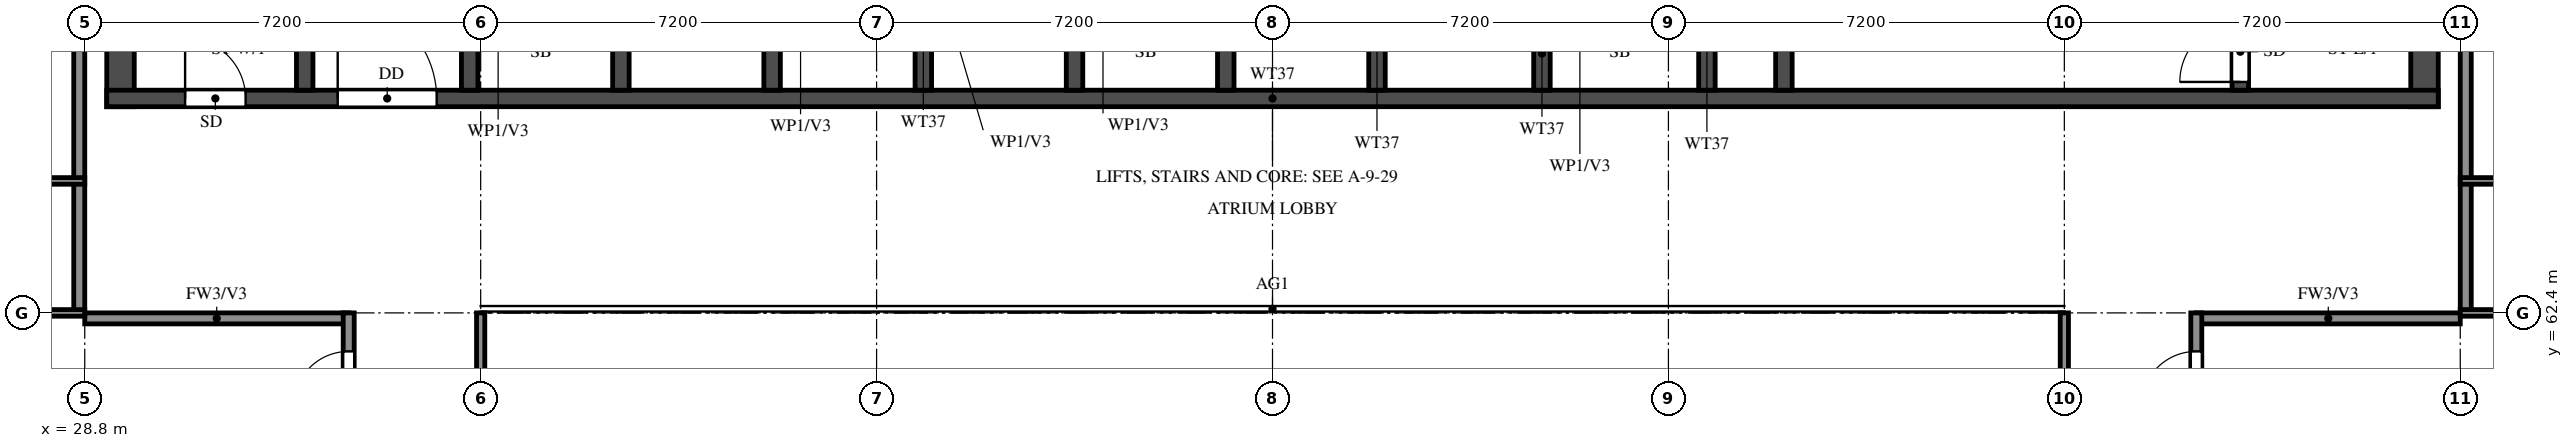
"""IFC4 building model, lengths in metres.
Left out: names, types, materials, properties, quantities, classifications, styles, units other than length and angle.
Written with IfcOpenShell. Run it as: python <this file> out.ifc"""

import sys

from ifc_helpers import new_model, si_unit, direction, frame, frame_2d, origin, place, context, subcontext, project, spatial, rectangle, extrude, element, fill, save


model = new_model("IFC4")
c1 = context("Model", 3, precision=1e-05, world=origin(), true_north=direction((0.0, 1.0)))
c2 = subcontext(c1, "Body", "Model", "MODEL_VIEW")
j1 = project(units=[si_unit("LENGTHUNIT", "METRE"), si_unit("PLANEANGLEUNIT", "RADIAN")], contexts=[c1])
p1 = place(None, origin())
s1 = spatial("IfcSite", under=j1, at=p1, CompositionType="ELEMENT")
p2 = place(p1, origin())
s2 = spatial("IfcBuilding", under=s1, at=p2, CompositionType="ELEMENT")
p3 = place(p2, frame((0.0, 0.0, 222.0)))
s3 = spatial("IfcBuildingStorey", under=s2, at=p3, CompositionType="ELEMENT", Elevation=222.0)
for number, where, z_axis, x_axis in (
    (1, (29.45, 66.15, 0.0), (0.0, 0.0, 1.0), (0.0, 1.0, 0.0)),
    (2, (71.35, 66.15, 0.0), (0.0, 0.0, 1.0), (0.0, 1.0, 0.0)),
):
    element("IfcWall", number, at=place(p3, frame(where, z_axis=z_axis, x_axis=x_axis)), inside=s3, PredefinedType="SHEAR", context=c2, shape_type="SweptSolid", body=[
        extrude(rectangle(XDim=11.85, YDim=0.5, at=frame_2d((5.925, 0.0))), origin(), (0.0, 0.0, 1.0), 3.22),
    ])
p4 = place(p3, frame((29.2, 66.3, 0.0), z_axis=(0.0, 0.0, 1.0), x_axis=(1.0, 0.0, 0.0)))
e3 = element("IfcWall", 3, at=p4, inside=s3, PredefinedType="SHEAR", context=c2, shape_type="SweptSolid", body=[
    extrude(rectangle(XDim=42.4, YDim=0.3, at=frame_2d((21.2, 0.0))), origin(), (0.0, 0.0, 1.0), 3.22),
])
p5 = place(p4, frame((1.425, 0.0, 0.0)))
e4 = element("IfcOpeningElement", 4, at=p5, cuts=e3, PredefinedType="OPENING", context=c2, shape_type="SweptSolid", body=[
    extrude(rectangle(XDim=1.1, YDim=2.1, at=frame_2d((0.55, 1.05))), frame((0.0, 0.16, 0.0), z_axis=(0.0, -1.0, 0.0), x_axis=(1.0, 0.0, 0.0)), (0.0, 0.0, 1.0), 0.32),
])
p6 = place(p4, frame((4.2, 0.0, 0.0)))
e5 = element("IfcOpeningElement", 5, at=p6, cuts=e3, PredefinedType="OPENING", context=c2, shape_type="SweptSolid", body=[
    extrude(rectangle(XDim=1.8, YDim=2.1, at=frame_2d((0.9, 1.05))), frame((0.0, 0.16, 0.0), z_axis=(0.0, -1.0, 0.0), x_axis=(1.0, 0.0, 0.0)), (0.0, 0.0, 1.0), 0.32),
])
p7 = place(p3, frame((32.8, 66.45, 0.0), z_axis=(0.0, 0.0, 1.0), x_axis=(0.0, 1.0, 0.0)))
e6 = element("IfcWall", 6, at=p7, inside=s3, PredefinedType="SHEAR", context=c2, shape_type="SweptSolid", body=[
    extrude(rectangle(XDim=11.05, YDim=0.3, at=frame_2d((5.525, 0.0))), origin(), (0.0, 0.0, 1.0), 3.22),
])
p8 = place(p3, frame((68.0, 66.45, 0.0), z_axis=(0.0, 0.0, 1.0), x_axis=(0.0, 1.0, 0.0)))
e7 = element("IfcWall", 7, at=p8, inside=s3, PredefinedType="SHEAR", context=c2, shape_type="SweptSolid", body=[
    extrude(rectangle(XDim=11.05, YDim=0.3, at=frame_2d((5.525, 0.0))), origin(), (0.0, 0.0, 1.0), 3.22),
])
p9 = place(p8, frame((0.15, 0.0, 0.0)))
e8 = element("IfcOpeningElement", 8, at=p9, cuts=e7, PredefinedType="OPENING", context=c2, shape_type="SweptSolid", body=[
    extrude(rectangle(XDim=1.1, YDim=2.1, at=frame_2d((0.55, 1.05))), frame((0.0, 0.16, 0.0), z_axis=(0.0, -1.0, 0.0), x_axis=(1.0, 0.0, 0.0)), (0.0, 0.0, 1.0), 0.32),
])
p10 = place(p3, frame((59.7, 66.45, 0.0), z_axis=(0.0, 0.0, 1.0), x_axis=(0.0, 1.0, 0.0)))
e9 = element("IfcWall", 9, at=p10, inside=s3, PredefinedType="SHEAR", context=c2, shape_type="SweptSolid", body=[
    extrude(rectangle(XDim=6.175, YDim=0.3, at=frame_2d((3.087, 0.0))), origin(), (0.0, 0.0, 1.0), 3.22),
])
p11 = place(p10, frame((3.85, 0.0, 0.0)))
e10 = element("IfcOpeningElement", 10, at=p11, cuts=e9, PredefinedType="OPENING", context=c2, shape_type="SweptSolid", body=[
    extrude(rectangle(XDim=1.2, YDim=2.1, at=frame_2d((0.6, 1.05))), frame((0.0, 0.16, 0.0), z_axis=(0.0, -1.0, 0.0), x_axis=(1.0, 0.0, 0.0)), (0.0, 0.0, 1.0), 0.32),
])
for number, where, z_axis, x_axis in (
    (11, (35.8, 66.45, 0.0), (0.0, 0.0, 1.0), (0.0, 1.0, 0.0)),
    (12, (38.55, 66.45, 0.0), (0.0, 0.0, 1.0), (0.0, 1.0, 0.0)),
    (13, (41.3, 66.45, 0.0), (0.0, 0.0, 1.0), (0.0, 1.0, 0.0)),
    (14, (44.05, 66.45, 0.0), (0.0, 0.0, 1.0), (0.0, 1.0, 0.0)),
    (15, (46.8, 66.45, 0.0), (0.0, 0.0, 1.0), (0.0, 1.0, 0.0)),
    (16, (49.55, 66.45, 0.0), (0.0, 0.0, 1.0), (0.0, 1.0, 0.0)),
    (17, (52.3, 66.45, 0.0), (0.0, 0.0, 1.0), (0.0, 1.0, 0.0)),
    (18, (55.3, 66.45, 0.0), (0.0, 0.0, 1.0), (0.0, 1.0, 0.0)),
    (19, (58.3, 66.45, 0.0), (0.0, 0.0, 1.0), (0.0, 1.0, 0.0)),
):
    element("IfcWall", number, at=place(p3, frame(where, z_axis=z_axis, x_axis=x_axis)), inside=s3, PredefinedType="SHEAR", context=c2, shape_type="SweptSolid", body=[
        extrude(rectangle(XDim=2.425, YDim=0.3, at=frame_2d((1.212, 0.0))), origin(), (0.0, 0.0, 1.0), 3.22),
    ])
for number, where, z_axis, x_axis in (
    (20, (28.8, 62.3, 0.0), (0.0, 0.0, 1.0), (1.0, 0.0, 0.0)),
    (21, (67.2, 62.3, 0.0), (0.0, 0.0, 1.0), (1.0, 0.0, 0.0)),
):
    element("IfcWall", number, at=place(p3, frame(where, z_axis=z_axis, x_axis=x_axis)), inside=s3, PredefinedType="SOLIDWALL", context=c2, shape_type="SweptSolid", body=[
        extrude(rectangle(XDim=4.8, YDim=0.2, at=frame_2d((2.4, 0.0))), origin(), (0.0, 0.0, 1.0), 3.22),
    ])
p12 = place(p3, frame((28.7, 62.4, 0.0), z_axis=(0.0, 0.0, 1.0), x_axis=(0.0, 1.0, 0.0)))
e22 = element("IfcWall", 22, at=p12, inside=s3, PredefinedType="SOLIDWALL", context=c2, shape_type="SweptSolid", body=[
    extrude(rectangle(XDim=15.6, YDim=0.2, at=frame_2d((7.8, 0.0))), origin(), (0.0, 0.0, 1.0), 3.22),
])
p13 = place(p3, frame((33.6, 60.0, 0.0), z_axis=(0.0, 0.0, 1.0), x_axis=(0.0, 1.0, 0.0)))
e23 = element("IfcWall", 23, at=p13, inside=s3, PredefinedType="SOLIDWALL", context=c2, shape_type="SweptSolid", body=[
    extrude(rectangle(XDim=2.4, YDim=0.2, at=frame_2d((1.2, 0.0))), origin(), (0.0, 0.0, 1.0), 3.22),
])
p14 = place(p13, frame((0.7, 0.0, 0.0)))
e24 = element("IfcOpeningElement", 24, at=p14, cuts=e23, PredefinedType="OPENING", context=c2, shape_type="SweptSolid", body=[
    extrude(rectangle(XDim=1.0, YDim=2.1, at=frame_2d((0.5, 1.05))), frame((0.0, 0.11, 0.0), z_axis=(0.0, -1.0, 0.0), x_axis=(1.0, 0.0, 0.0)), (0.0, 0.0, 1.0), 0.22),
])
p15 = place(p3, frame((67.2, 60.0, 0.0), z_axis=(0.0, 0.0, 1.0), x_axis=(0.0, 1.0, 0.0)))
e25 = element("IfcWall", 25, at=p15, inside=s3, PredefinedType="SOLIDWALL", context=c2, shape_type="SweptSolid", body=[
    extrude(rectangle(XDim=2.4, YDim=0.2, at=frame_2d((1.2, 0.0))), origin(), (0.0, 0.0, 1.0), 3.22),
])
p16 = place(p15, frame((0.7, 0.0, 0.0)))
e26 = element("IfcOpeningElement", 26, at=p16, cuts=e25, PredefinedType="OPENING", context=c2, shape_type="SweptSolid", body=[
    extrude(rectangle(XDim=1.0, YDim=2.1, at=frame_2d((0.5, 1.05))), frame((0.0, 0.11, 0.0), z_axis=(0.0, -1.0, 0.0), x_axis=(1.0, 0.0, 0.0)), (0.0, 0.0, 1.0), 0.22),
])
p17 = place(p3, frame((72.1, 62.4, 0.0), z_axis=(0.0, 0.0, 1.0), x_axis=(0.0, 1.0, 0.0)))
e27 = element("IfcWall", 27, at=p17, inside=s3, PredefinedType="SOLIDWALL", context=c2, shape_type="SweptSolid", body=[
    extrude(rectangle(XDim=15.6, YDim=0.2, at=frame_2d((7.8, 0.0))), origin(), (0.0, 0.0, 1.0), 3.22),
])
p18 = place(p3, frame((26.4, 62.4, 0.0), z_axis=(0.0, 0.0, 1.0), x_axis=(1.0, 0.0, 0.0)))
e28 = element("IfcWall", 28, at=p18, inside=s3, PredefinedType="PARTITIONING", context=c2, shape_type="SweptSolid", body=[
    extrude(rectangle(XDim=2.4, YDim=0.12, at=frame_2d((1.2, 0.0))), origin(), (0.0, 0.0, 1.0), 3.22),
])
p19 = place(p18, frame((0.75, 0.0, 0.0)))
e29 = element("IfcOpeningElement", 29, at=p19, cuts=e28, PredefinedType="OPENING", context=c2, shape_type="SweptSolid", body=[
    extrude(rectangle(XDim=0.9, YDim=2.1, at=frame_2d((0.45, 1.05))), frame((0.0, 0.07, 0.0), z_axis=(0.0, -1.0, 0.0), x_axis=(1.0, 0.0, 0.0)), (0.0, 0.0, 1.0), 0.14),
])
p20 = place(p3, frame((72.0, 62.4, 0.0), z_axis=(0.0, 0.0, 1.0), x_axis=(1.0, 0.0, 0.0)))
e30 = element("IfcWall", 30, at=p20, inside=s3, PredefinedType="PARTITIONING", context=c2, shape_type="SweptSolid", body=[
    extrude(rectangle(XDim=2.4, YDim=0.12, at=frame_2d((1.2, 0.0))), origin(), (0.0, 0.0, 1.0), 3.22),
])
p21 = place(p20, frame((0.75, 0.0, 0.0)))
e31 = element("IfcOpeningElement", 31, at=p21, cuts=e30, PredefinedType="OPENING", context=c2, shape_type="SweptSolid", body=[
    extrude(rectangle(XDim=0.9, YDim=2.1, at=frame_2d((0.45, 1.05))), frame((0.0, 0.07, 0.0), z_axis=(0.0, -1.0, 0.0), x_axis=(1.0, 0.0, 0.0)), (0.0, 0.0, 1.0), 0.14),
])
p22 = place(p3, frame((25.3, 64.8, 0.0), z_axis=(0.0, 0.0, 1.0), x_axis=(1.0, 0.0, 0.0)))
e32 = element("IfcWall", 32, at=p22, inside=s3, PredefinedType="PARTITIONING", context=c2, shape_type="SweptSolid", body=[
    extrude(rectangle(XDim=3.5, YDim=0.12, at=frame_2d((1.75, 0.0))), origin(), (0.0, 0.0, 1.0), 3.22),
])
p23 = place(p22, frame((1.35, 0.0, 0.0)))
e33 = element("IfcOpeningElement", 33, at=p23, cuts=e32, PredefinedType="OPENING", context=c2, shape_type="SweptSolid", body=[
    extrude(rectangle(XDim=0.8, YDim=2.1, at=frame_2d((0.4, 1.05))), frame((0.0, 0.07, 0.0), z_axis=(0.0, -1.0, 0.0), x_axis=(1.0, 0.0, 0.0)), (0.0, 0.0, 1.0), 0.14),
])
p24 = place(p3, frame((72.0, 64.8, 0.0), z_axis=(0.0, 0.0, 1.0), x_axis=(1.0, 0.0, 0.0)))
e34 = element("IfcWall", 34, at=p24, inside=s3, PredefinedType="PARTITIONING", context=c2, shape_type="SweptSolid", body=[
    extrude(rectangle(XDim=3.5, YDim=0.12, at=frame_2d((1.75, 0.0))), origin(), (0.0, 0.0, 1.0), 3.22),
])
for number, where, z_axis, x_axis in (
    (35, (36.0, 48.0, 0.0), (0.0, 0.0, 1.0), (0.0, 1.0, 0.0)),
    (36, (64.8, 48.0, 0.0), (0.0, 0.0, 1.0), (0.0, 1.0, 0.0)),
):
    element("IfcWall", number, at=place(p3, frame(where, z_axis=z_axis, x_axis=x_axis)), inside=s3, PredefinedType="SOLIDWALL", context=c2, shape_type="SweptSolid", body=[
        extrude(rectangle(XDim=14.4, YDim=0.15, at=frame_2d((7.2, 0.0))), origin(), (0.0, 0.0, 1.0), 2.32),
    ])
p25 = place(p5, origin())
e37 = element("IfcDoor", 37, at=p25, inside=s3, OperationType="SINGLE_SWING_LEFT", PredefinedType="DOOR", context=c2, shape_type="SweptSolid", body=[
    extrude(rectangle(XDim=1.1, YDim=2.1, at=frame_2d((0.55, 1.05))), frame((0.0, 0.025, 0.0), z_axis=(0.0, -1.0, 0.0), x_axis=(1.0, 0.0, 0.0)), (0.0, 0.0, 1.0), 0.05),
])
fill(e4, e37)
p26 = place(p9, origin())
e38 = element("IfcDoor", 38, at=p26, inside=s3, OperationType="SINGLE_SWING_RIGHT", PredefinedType="DOOR", context=c2, shape_type="SweptSolid", body=[
    extrude(rectangle(XDim=1.1, YDim=2.1, at=frame_2d((0.55, 1.05))), frame((0.0, 0.025, 0.0), z_axis=(0.0, -1.0, 0.0), x_axis=(1.0, 0.0, 0.0)), (0.0, 0.0, 1.0), 0.05),
])
fill(e8, e38)
p27 = place(p6, origin())
e39 = element("IfcDoor", 39, at=p27, inside=s3, OperationType="DOUBLE_DOOR_SINGLE_SWING", PredefinedType="DOOR", context=c2, shape_type="SweptSolid", body=[
    extrude(rectangle(XDim=1.8, YDim=2.1, at=frame_2d((0.9, 1.05))), frame((0.0, 0.025, 0.0), z_axis=(0.0, -1.0, 0.0), x_axis=(1.0, 0.0, 0.0)), (0.0, 0.0, 1.0), 0.05),
])
fill(e5, e39)
p28 = place(p14, origin())
e40 = element("IfcDoor", 40, at=p28, inside=s3, OperationType="SINGLE_SWING_LEFT", PredefinedType="DOOR", context=c2, shape_type="SweptSolid", body=[
    extrude(rectangle(XDim=1.0, YDim=2.1, at=frame_2d((0.5, 1.05))), frame((0.0, 0.025, 0.0), z_axis=(0.0, -1.0, 0.0), x_axis=(1.0, 0.0, 0.0)), (0.0, 0.0, 1.0), 0.05),
])
fill(e24, e40)
p29 = place(p16, origin())
e41 = element("IfcDoor", 41, at=p29, inside=s3, OperationType="SINGLE_SWING_LEFT", PredefinedType="DOOR", context=c2, shape_type="SweptSolid", body=[
    extrude(rectangle(XDim=1.0, YDim=2.1, at=frame_2d((0.5, 1.05))), frame((0.0, 0.025, 0.0), z_axis=(0.0, -1.0, 0.0), x_axis=(1.0, 0.0, 0.0)), (0.0, 0.0, 1.0), 0.05),
])
fill(e26, e41)
save(model, sys.argv[1])
